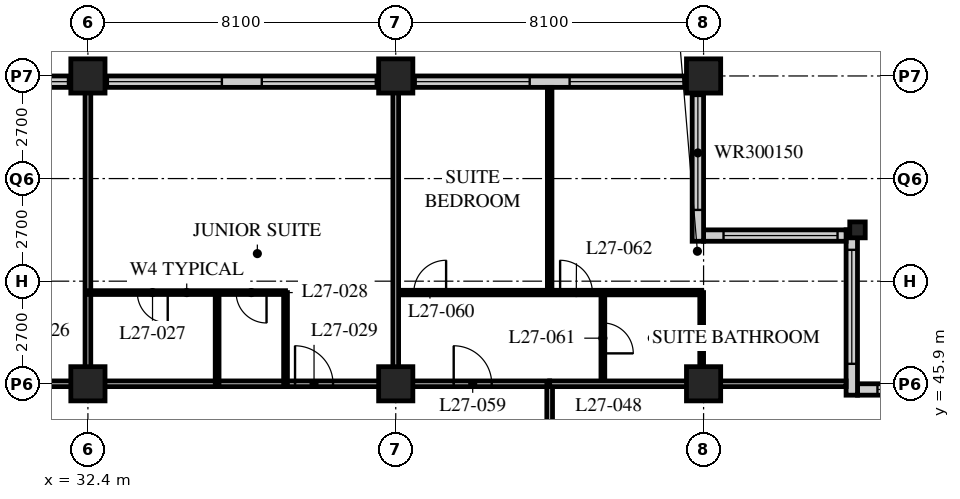
"""IFC4 building model, lengths in metres.
Left out: names, types, materials, properties, quantities, classifications, styles, units other than length and angle.
Written with IfcOpenShell. Run it as: python <this file> out.ifc"""

import sys

from ifc_helpers import new_model, si_unit, direction, frame, frame_2d, origin, origin_2d, place, context, subcontext, project, spatial, rectangle, hollow_rectangle, i_section, extrude, element, fill, save


model = new_model("IFC4")
c1 = context("Model", 3, precision=1e-05, world=origin(), true_north=direction((0.0, 1.0)))
c2 = subcontext(c1, "Body", "Model", "MODEL_VIEW")
j1 = project(units=[si_unit("LENGTHUNIT", "METRE"), si_unit("PLANEANGLEUNIT", "RADIAN")], contexts=[c1])
p1 = place(None, origin())
s1 = spatial("IfcSite", under=j1, at=p1, CompositionType="ELEMENT")
p2 = place(p1, origin())
s2 = spatial("IfcBuilding", under=s1, at=p2, CompositionType="ELEMENT")
p3 = place(p2, frame((0.0, 0.0, 110.2)))
s3 = spatial("IfcBuildingStorey", under=s2, at=p3, CompositionType="ELEMENT", Elevation=110.2)
for number, where, z_axis, x_axis in (
    (1, (32.4, 45.9, 0.0), (0.0, 0.0, 1.0), (1.0, 0.0, 0.0)),
    (2, (32.4, 54.0, 0.0), (0.0, 0.0, 1.0), (1.0, 0.0, 0.0)),
    (3, (40.5, 45.9, 0.0), (0.0, 0.0, 1.0), (1.0, 0.0, 0.0)),
    (4, (40.5, 54.0, 0.0), (0.0, 0.0, 1.0), (1.0, 0.0, 0.0)),
    (5, (48.6, 45.9, 0.0), (0.0, 0.0, 1.0), (1.0, 0.0, 0.0)),
    (6, (48.6, 54.0, 0.0), (0.0, 0.0, 1.0), (1.0, 0.0, 0.0)),
):
    element("IfcColumn", number, at=place(p3, frame(where, z_axis=z_axis, x_axis=x_axis)), inside=s3, PredefinedType="COLUMN", context=c2, shape_type="SweptSolid", body=[
        extrude(hollow_rectangle(XDim=0.9, YDim=0.9, WallThickness=0.09, at=origin_2d()), origin(), (0.0, 0.0, 1.0), 3.4),
    ])
p4 = place(p3, frame((52.65, 49.95, 0.0), z_axis=(0.0, 0.0, 1.0), x_axis=(1.0, 0.0, 0.0)))
e7 = element("IfcColumn", 7, at=p4, inside=s3, PredefinedType="COLUMN", context=c2, shape_type="SweptSolid", body=[
    extrude(i_section(OverallWidth=0.407, OverallDepth=0.419, WebThickness=0.031, FlangeThickness=0.049, FilletRadius=0.015, at=origin_2d()), origin(), (0.0, 0.0, 1.0), 3.4),
])
p5 = place(p3, frame((56.4, 45.75, 0.0), z_axis=(0.0, 0.0, 1.0), x_axis=(-1.0, 0.0, 0.0)))
e8 = element("IfcWall", 8, at=p5, inside=s3, PredefinedType="SOLIDWALL", context=c2, shape_type="SweptSolid", body=[
    extrude(rectangle(XDim=3.75, YDim=0.3, at=frame_2d((1.875, 0.0))), origin(), (0.0, 0.0, 1.0), 3.19),
])
p6 = place(p5, frame((0.225, 0.0, 0.9)))
e9 = element("IfcOpeningElement", 9, at=p6, cuts=e8, PredefinedType="OPENING", context=c2, shape_type="SweptSolid", body=[
    extrude(rectangle(XDim=3.0, YDim=1.5, at=frame_2d((1.5, 0.75))), frame((0.0, 0.16, 0.0), z_axis=(0.0, -1.0, 0.0), x_axis=(1.0, 0.0, 0.0)), (0.0, 0.0, 1.0), 0.32),
])
p7 = place(p3, frame((52.5, 45.6, 0.0), z_axis=(0.0, 0.0, 1.0), x_axis=(0.0, 1.0, 0.0)))
e10 = element("IfcWall", 10, at=p7, inside=s3, PredefinedType="SOLIDWALL", context=c2, shape_type="SweptSolid", body=[
    extrude(rectangle(XDim=4.35, YDim=0.3, at=frame_2d((2.175, 0.0))), origin(), (0.0, 0.0, 1.0), 3.19),
])
p8 = place(p7, frame((0.825, 0.0, 0.9)))
e11 = element("IfcOpeningElement", 11, at=p8, cuts=e10, PredefinedType="OPENING", context=c2, shape_type="SweptSolid", body=[
    extrude(rectangle(XDim=3.0, YDim=1.5, at=frame_2d((1.5, 0.75))), frame((0.0, 0.16, 0.0), z_axis=(0.0, -1.0, 0.0), x_axis=(1.0, 0.0, 0.0)), (0.0, 0.0, 1.0), 0.32),
])
p9 = place(p3, frame((52.35, 49.8, 0.0), z_axis=(0.0, 0.0, 1.0), x_axis=(-1.0, 0.0, 0.0)))
e12 = element("IfcWall", 12, at=p9, inside=s3, PredefinedType="SOLIDWALL", context=c2, shape_type="SweptSolid", body=[
    extrude(rectangle(XDim=3.75, YDim=0.3, at=frame_2d((1.875, 0.0))), origin(), (0.0, 0.0, 1.0), 3.19),
])
p10 = place(p9, frame((0.225, 0.0, 0.9)))
e13 = element("IfcOpeningElement", 13, at=p10, cuts=e12, PredefinedType="OPENING", context=c2, shape_type="SweptSolid", body=[
    extrude(rectangle(XDim=3.0, YDim=1.5, at=frame_2d((1.5, 0.75))), frame((0.0, 0.16, 0.0), z_axis=(0.0, -1.0, 0.0), x_axis=(1.0, 0.0, 0.0)), (0.0, 0.0, 1.0), 0.32),
])
p11 = place(p3, frame((48.45, 49.65, 0.0), z_axis=(0.0, 0.0, 1.0), x_axis=(0.0, 1.0, 0.0)))
e14 = element("IfcWall", 14, at=p11, inside=s3, PredefinedType="SOLIDWALL", context=c2, shape_type="SweptSolid", body=[
    extrude(rectangle(XDim=4.35, YDim=0.3, at=frame_2d((2.175, 0.0))), origin(), (0.0, 0.0, 1.0), 3.19),
])
p12 = place(p11, frame((0.825, 0.0, 0.9)))
e15 = element("IfcOpeningElement", 15, at=p12, cuts=e14, PredefinedType="OPENING", context=c2, shape_type="SweptSolid", body=[
    extrude(rectangle(XDim=3.0, YDim=1.5, at=frame_2d((1.5, 0.75))), frame((0.0, 0.16, 0.0), z_axis=(0.0, -1.0, 0.0), x_axis=(1.0, 0.0, 0.0)), (0.0, 0.0, 1.0), 0.32),
])
p13 = place(p3, frame((48.3, 53.85, 0.0), z_axis=(0.0, 0.0, 1.0), x_axis=(-1.0, 0.0, 0.0)))
e16 = element("IfcWall", 16, at=p13, inside=s3, PredefinedType="SOLIDWALL", context=c2, shape_type="SweptSolid", body=[
    extrude(rectangle(XDim=40.2, YDim=0.3, at=frame_2d((20.1, 0.0))), origin(), (0.0, 0.0, 1.0), 3.19),
])
p14 = place(p13, frame((0.225, 0.0, 0.9)))
e17 = element("IfcOpeningElement", 17, at=p14, cuts=e16, PredefinedType="OPENING", context=c2, shape_type="SweptSolid", body=[
    extrude(rectangle(XDim=3.0, YDim=2.0, at=frame_2d((1.5, 1.0))), frame((0.0, 0.16, 0.0), z_axis=(0.0, -1.0, 0.0), x_axis=(1.0, 0.0, 0.0)), (0.0, 0.0, 1.0), 0.32),
])
p15 = place(p13, frame((4.275, 0.0, 0.9)))
e18 = element("IfcOpeningElement", 18, at=p15, cuts=e16, PredefinedType="OPENING", context=c2, shape_type="SweptSolid", body=[
    extrude(rectangle(XDim=3.0, YDim=2.0, at=frame_2d((1.5, 1.0))), frame((0.0, 0.16, 0.0), z_axis=(0.0, -1.0, 0.0), x_axis=(1.0, 0.0, 0.0)), (0.0, 0.0, 1.0), 0.32),
])
p16 = place(p13, frame((8.325, 0.0, 0.9)))
e19 = element("IfcOpeningElement", 19, at=p16, cuts=e16, PredefinedType="OPENING", context=c2, shape_type="SweptSolid", body=[
    extrude(rectangle(XDim=3.0, YDim=2.0, at=frame_2d((1.5, 1.0))), frame((0.0, 0.16, 0.0), z_axis=(0.0, -1.0, 0.0), x_axis=(1.0, 0.0, 0.0)), (0.0, 0.0, 1.0), 0.32),
])
p17 = place(p13, frame((12.375, 0.0, 0.9)))
e20 = element("IfcOpeningElement", 20, at=p17, cuts=e16, PredefinedType="OPENING", context=c2, shape_type="SweptSolid", body=[
    extrude(rectangle(XDim=3.0, YDim=2.0, at=frame_2d((1.5, 1.0))), frame((0.0, 0.16, 0.0), z_axis=(0.0, -1.0, 0.0), x_axis=(1.0, 0.0, 0.0)), (0.0, 0.0, 1.0), 0.32),
])
p18 = place(p13, frame((16.425, 0.0, 0.9)))
e21 = element("IfcOpeningElement", 21, at=p18, cuts=e16, PredefinedType="OPENING", context=c2, shape_type="SweptSolid", body=[
    extrude(rectangle(XDim=3.0, YDim=2.0, at=frame_2d((1.5, 1.0))), frame((0.0, 0.16, 0.0), z_axis=(0.0, -1.0, 0.0), x_axis=(1.0, 0.0, 0.0)), (0.0, 0.0, 1.0), 0.32),
])
p19 = place(p13, frame((20.475, 0.0, 0.9)))
e22 = element("IfcOpeningElement", 22, at=p19, cuts=e16, PredefinedType="OPENING", context=c2, shape_type="SweptSolid", body=[
    extrude(rectangle(XDim=3.0, YDim=2.0, at=frame_2d((1.5, 1.0))), frame((0.0, 0.16, 0.0), z_axis=(0.0, -1.0, 0.0), x_axis=(1.0, 0.0, 0.0)), (0.0, 0.0, 1.0), 0.32),
])
p20 = place(p13, frame((24.525, 0.0, 0.9)))
e23 = element("IfcOpeningElement", 23, at=p20, cuts=e16, PredefinedType="OPENING", context=c2, shape_type="SweptSolid", body=[
    extrude(rectangle(XDim=3.0, YDim=2.0, at=frame_2d((1.5, 1.0))), frame((0.0, 0.16, 0.0), z_axis=(0.0, -1.0, 0.0), x_axis=(1.0, 0.0, 0.0)), (0.0, 0.0, 1.0), 0.32),
])
p21 = place(p13, frame((28.575, 0.0, 0.9)))
e24 = element("IfcOpeningElement", 24, at=p21, cuts=e16, PredefinedType="OPENING", context=c2, shape_type="SweptSolid", body=[
    extrude(rectangle(XDim=3.0, YDim=2.0, at=frame_2d((1.5, 1.0))), frame((0.0, 0.16, 0.0), z_axis=(0.0, -1.0, 0.0), x_axis=(1.0, 0.0, 0.0)), (0.0, 0.0, 1.0), 0.32),
])
p22 = place(p13, frame((32.625, 0.0, 0.9)))
e25 = element("IfcOpeningElement", 25, at=p22, cuts=e16, PredefinedType="OPENING", context=c2, shape_type="SweptSolid", body=[
    extrude(rectangle(XDim=3.0, YDim=2.0, at=frame_2d((1.5, 1.0))), frame((0.0, 0.16, 0.0), z_axis=(0.0, -1.0, 0.0), x_axis=(1.0, 0.0, 0.0)), (0.0, 0.0, 1.0), 0.32),
])
p23 = place(p13, frame((36.675, 0.0, 0.9)))
e26 = element("IfcOpeningElement", 26, at=p23, cuts=e16, PredefinedType="OPENING", context=c2, shape_type="SweptSolid", body=[
    extrude(rectangle(XDim=3.0, YDim=2.0, at=frame_2d((1.5, 1.0))), frame((0.0, 0.16, 0.0), z_axis=(0.0, -1.0, 0.0), x_axis=(1.0, 0.0, 0.0)), (0.0, 0.0, 1.0), 0.32),
])
p24 = place(p3, frame((12.15, 45.9, 0.0), z_axis=(0.0, 0.0, 1.0), x_axis=(1.0, 0.0, 0.0)))
e27 = element("IfcWall", 27, at=p24, inside=s3, PredefinedType="PARTITIONING", context=c2, shape_type="SweptSolid", body=[
    extrude(rectangle(XDim=32.4, YDim=0.15, at=frame_2d((16.2, 0.0))), origin(), (0.0, 0.0, 1.0), 2.578),
])
p25 = place(p24, frame((9.5, 0.0, 0.0)))
e28 = element("IfcOpeningElement", 28, at=p25, cuts=e27, PredefinedType="OPENING", context=c2, shape_type="SweptSolid", body=[
    extrude(rectangle(XDim=1.0, YDim=2.1, at=frame_2d((0.5, 1.05))), frame((0.0, 0.085, 0.0), z_axis=(0.0, -1.0, 0.0), x_axis=(1.0, 0.0, 0.0)), (0.0, 0.0, 1.0), 0.17),
])
p26 = place(p24, frame((17.6, 0.0, 0.0)))
e29 = element("IfcOpeningElement", 29, at=p26, cuts=e27, PredefinedType="OPENING", context=c2, shape_type="SweptSolid", body=[
    extrude(rectangle(XDim=1.0, YDim=2.1, at=frame_2d((0.5, 1.05))), frame((0.0, 0.085, 0.0), z_axis=(0.0, -1.0, 0.0), x_axis=(1.0, 0.0, 0.0)), (0.0, 0.0, 1.0), 0.17),
])
p27 = place(p24, frame((25.7, 0.0, 0.0)))
e30 = element("IfcOpeningElement", 30, at=p27, cuts=e27, PredefinedType="OPENING", context=c2, shape_type="SweptSolid", body=[
    extrude(rectangle(XDim=1.0, YDim=2.1, at=frame_2d((0.5, 1.05))), frame((0.0, 0.085, 0.0), z_axis=(0.0, -1.0, 0.0), x_axis=(1.0, 0.0, 0.0)), (0.0, 0.0, 1.0), 0.17),
])
p28 = place(p24, frame((29.875, 0.0, 0.0)))
e31 = element("IfcOpeningElement", 31, at=p28, cuts=e27, PredefinedType="OPENING", context=c2, shape_type="SweptSolid", body=[
    extrude(rectangle(XDim=1.0, YDim=2.1, at=frame_2d((0.5, 1.05))), frame((0.0, 0.085, 0.0), z_axis=(0.0, -1.0, 0.0), x_axis=(1.0, 0.0, 0.0)), (0.0, 0.0, 1.0), 0.17),
])
p29 = place(p24, frame((1.525, 0.0, 0.0)))
e32 = element("IfcOpeningElement", 32, at=p29, cuts=e27, PredefinedType="OPENING", context=c2, shape_type="SweptSolid", body=[
    extrude(rectangle(XDim=1.0, YDim=2.1, at=frame_2d((0.5, 1.05))), frame((0.0, 0.085, 0.0), z_axis=(0.0, -1.0, 0.0), x_axis=(1.0, 0.0, 0.0)), (0.0, 0.0, 1.0), 0.17),
])
p30 = place(p3, frame((44.55, 21.6, 0.0), z_axis=(0.0, 0.0, 1.0), x_axis=(0.0, 1.0, 0.0)))
e33 = element("IfcWall", 33, at=p30, inside=s3, PredefinedType="PARTITIONING", context=c2, shape_type="SweptSolid", body=[
    extrude(rectangle(XDim=24.3, YDim=0.15, at=frame_2d((12.15, 0.0))), origin(), (0.0, 0.0, 1.0), 3.19),
])
p31 = place(p30, frame((2.75, 0.0, 0.0)))
e34 = element("IfcOpeningElement", 34, at=p31, cuts=e33, PredefinedType="OPENING", context=c2, shape_type="SweptSolid", body=[
    extrude(rectangle(XDim=1.0, YDim=2.1, at=frame_2d((0.5, 1.05))), frame((0.0, 0.085, 0.0), z_axis=(0.0, -1.0, 0.0), x_axis=(1.0, 0.0, 0.0)), (0.0, 0.0, 1.0), 0.17),
])
p32 = place(p30, frame((6.5, 0.0, 0.0)))
e35 = element("IfcOpeningElement", 35, at=p32, cuts=e33, PredefinedType="OPENING", context=c2, shape_type="SweptSolid", body=[
    extrude(rectangle(XDim=1.0, YDim=2.1, at=frame_2d((0.5, 1.05))), frame((0.0, 0.085, 0.0), z_axis=(0.0, -1.0, 0.0), x_axis=(1.0, 0.0, 0.0)), (0.0, 0.0, 1.0), 0.17),
])
p33 = place(p30, frame((13.55, 0.0, 0.0)))
e36 = element("IfcOpeningElement", 36, at=p33, cuts=e33, PredefinedType="OPENING", context=c2, shape_type="SweptSolid", body=[
    extrude(rectangle(XDim=1.0, YDim=2.1, at=frame_2d((0.5, 1.05))), frame((0.0, 0.085, 0.0), z_axis=(0.0, -1.0, 0.0), x_axis=(1.0, 0.0, 0.0)), (0.0, 0.0, 1.0), 0.17),
])
p34 = place(p30, frame((21.65, 0.0, 0.0)))
e37 = element("IfcOpeningElement", 37, at=p34, cuts=e33, PredefinedType="OPENING", context=c2, shape_type="SweptSolid", body=[
    extrude(rectangle(XDim=1.0, YDim=2.1, at=frame_2d((0.5, 1.05))), frame((0.0, 0.085, 0.0), z_axis=(0.0, -1.0, 0.0), x_axis=(1.0, 0.0, 0.0)), (0.0, 0.0, 1.0), 0.17),
])
p35 = place(p3, frame((32.4, 45.9, 0.0), z_axis=(0.0, 0.0, 1.0), x_axis=(0.0, 1.0, 0.0)))
e38 = element("IfcWall", 38, at=p35, inside=s3, PredefinedType="PARTITIONING", context=c2, shape_type="SweptSolid", body=[
    extrude(rectangle(XDim=7.8, YDim=0.15, at=frame_2d((3.9, 0.0))), origin(), (0.0, 0.0, 1.0), 2.578),
])
p36 = place(p3, frame((32.4, 48.3, 0.0), z_axis=(0.0, 0.0, 1.0), x_axis=(1.0, 0.0, 0.0)))
e39 = element("IfcWall", 39, at=p36, inside=s3, PredefinedType="PARTITIONING", context=c2, shape_type="SweptSolid", body=[
    extrude(rectangle(XDim=5.2, YDim=0.1, at=frame_2d((2.6, 0.0))), origin(), (0.0, 0.0, 1.0), 3.19),
])
p37 = place(p36, frame((1.3, 0.0, 0.0)))
e40 = element("IfcOpeningElement", 40, at=p37, cuts=e39, PredefinedType="OPENING", context=c2, shape_type="SweptSolid", body=[
    extrude(rectangle(XDim=0.8, YDim=2.1, at=frame_2d((0.4, 1.05))), frame((0.0, 0.06, 0.0), z_axis=(0.0, -1.0, 0.0), x_axis=(1.0, 0.0, 0.0)), (0.0, 0.0, 1.0), 0.12),
])
p38 = place(p36, frame((3.9, 0.0, 0.0)))
e41 = element("IfcOpeningElement", 41, at=p38, cuts=e39, PredefinedType="OPENING", context=c2, shape_type="SweptSolid", body=[
    extrude(rectangle(XDim=0.8, YDim=2.1, at=frame_2d((0.4, 1.05))), frame((0.0, 0.06, 0.0), z_axis=(0.0, -1.0, 0.0), x_axis=(1.0, 0.0, 0.0)), (0.0, 0.0, 1.0), 0.12),
])
for number, where, z_axis, x_axis in (
    (42, (35.8, 45.9, 0.0), (0.0, 0.0, 1.0), (0.0, 1.0, 0.0)),
    (43, (37.6, 45.9, 0.0), (0.0, 0.0, 1.0), (0.0, 1.0, 0.0)),
):
    element("IfcWall", number, at=place(p3, frame(where, z_axis=z_axis, x_axis=x_axis)), inside=s3, PredefinedType="PARTITIONING", context=c2, shape_type="SweptSolid", body=[
        extrude(rectangle(XDim=2.4, YDim=0.1, at=frame_2d((1.2, 0.0))), origin(), (0.0, 0.0, 1.0), 3.19),
    ])
p39 = place(p3, frame((40.5, 48.3, 0.0), z_axis=(0.0, 0.0, 1.0), x_axis=(1.0, 0.0, 0.0)))
e44 = element("IfcWall", 44, at=p39, inside=s3, PredefinedType="PARTITIONING", context=c2, shape_type="SweptSolid", body=[
    extrude(rectangle(XDim=8.05, YDim=0.12, at=frame_2d((4.025, 0.0))), origin(), (0.0, 0.0, 1.0), 3.19),
])
p40 = place(p39, frame((0.475, 0.0, 0.0)))
e45 = element("IfcOpeningElement", 45, at=p40, cuts=e44, PredefinedType="OPENING", context=c2, shape_type="SweptSolid", body=[
    extrude(rectangle(XDim=0.85, YDim=2.1, at=frame_2d((0.425, 1.05))), frame((0.0, 0.07, 0.0), z_axis=(0.0, -1.0, 0.0), x_axis=(1.0, 0.0, 0.0)), (0.0, 0.0, 1.0), 0.14),
])
p41 = place(p39, frame((4.325, 0.0, 0.0)))
e46 = element("IfcOpeningElement", 46, at=p41, cuts=e44, PredefinedType="OPENING", context=c2, shape_type="SweptSolid", body=[
    extrude(rectangle(XDim=0.85, YDim=2.1, at=frame_2d((0.425, 1.05))), frame((0.0, 0.07, 0.0), z_axis=(0.0, -1.0, 0.0), x_axis=(1.0, 0.0, 0.0)), (0.0, 0.0, 1.0), 0.14),
])
p42 = place(p3, frame((45.95, 45.9, 0.0), z_axis=(0.0, 0.0, 1.0), x_axis=(0.0, 1.0, 0.0)))
e47 = element("IfcWall", 47, at=p42, inside=s3, PredefinedType="PARTITIONING", context=c2, shape_type="SweptSolid", body=[
    extrude(rectangle(XDim=2.4, YDim=0.1, at=frame_2d((1.2, 0.0))), origin(), (0.0, 0.0, 1.0), 3.19),
])
p43 = place(p42, frame((0.8, 0.0, 0.0)))
e48 = element("IfcOpeningElement", 48, at=p43, cuts=e47, PredefinedType="OPENING", context=c2, shape_type="SweptSolid", body=[
    extrude(rectangle(XDim=0.8, YDim=2.1, at=frame_2d((0.4, 1.05))), frame((0.0, 0.06, 0.0), z_axis=(0.0, -1.0, 0.0), x_axis=(1.0, 0.0, 0.0)), (0.0, 0.0, 1.0), 0.12),
])
p44 = place(p3, frame((48.55, 45.9, 0.0), z_axis=(0.0, 0.0, 1.0), x_axis=(0.0, 1.0, 0.0)))
e49 = element("IfcWall", 49, at=p44, inside=s3, PredefinedType="PARTITIONING", context=c2, shape_type="SweptSolid", body=[
    extrude(rectangle(XDim=2.4, YDim=0.1, at=frame_2d((1.2, 0.0))), origin(), (0.0, 0.0, 1.0), 2.578),
])
p45 = place(p3, frame((44.55, 48.3, 0.0), z_axis=(0.0, 0.0, 1.0), x_axis=(0.0, 1.0, 0.0)))
e50 = element("IfcWall", 50, at=p45, inside=s3, PredefinedType="PARTITIONING", context=c2, shape_type="SweptSolid", body=[
    extrude(rectangle(XDim=5.4, YDim=0.12, at=frame_2d((2.7, 0.0))), origin(), (0.0, 0.0, 1.0), 3.19),
])
for number, where, z_axis, x_axis in (
    (51, (44.55, 45.9, 0.0), (0.0, 0.0, 1.0), (1.0, 0.0, 0.0)),
    (52, (40.5, 45.9, 0.0), (0.0, 0.0, 1.0), (0.0, 1.0, 0.0)),
):
    element("IfcWall", number, at=place(p3, frame(where, z_axis=z_axis, x_axis=x_axis)), inside=s3, PredefinedType="PARTITIONING", context=c2, shape_type="SweptSolid", body=[
        extrude(rectangle(XDim=7.8, YDim=0.15, at=frame_2d((3.9, 0.0))), origin(), (0.0, 0.0, 1.0), 2.578),
    ])
p46 = place(p6, origin())
e53 = element("IfcWindow", 53, at=p46, inside=s3, PartitioningType="SINGLE_PANEL", PredefinedType="WINDOW", context=c2, shape_type="SweptSolid", body=[
    extrude(rectangle(XDim=3.0, YDim=1.5, at=frame_2d((1.5, 0.75))), frame((0.0, 0.03, 0.0), z_axis=(0.0, -1.0, 0.0), x_axis=(1.0, 0.0, 0.0)), (0.0, 0.0, 1.0), 0.06),
])
fill(e9, e53)
p47 = place(p8, origin())
e54 = element("IfcWindow", 54, at=p47, inside=s3, PartitioningType="SINGLE_PANEL", PredefinedType="WINDOW", context=c2, shape_type="SweptSolid", body=[
    extrude(rectangle(XDim=3.0, YDim=1.5, at=frame_2d((1.5, 0.75))), frame((0.0, 0.03, 0.0), z_axis=(0.0, -1.0, 0.0), x_axis=(1.0, 0.0, 0.0)), (0.0, 0.0, 1.0), 0.06),
])
fill(e11, e54)
p48 = place(p10, origin())
e55 = element("IfcWindow", 55, at=p48, inside=s3, PartitioningType="SINGLE_PANEL", PredefinedType="WINDOW", context=c2, shape_type="SweptSolid", body=[
    extrude(rectangle(XDim=3.0, YDim=1.5, at=frame_2d((1.5, 0.75))), frame((0.0, 0.03, 0.0), z_axis=(0.0, -1.0, 0.0), x_axis=(1.0, 0.0, 0.0)), (0.0, 0.0, 1.0), 0.06),
])
fill(e13, e55)
p49 = place(p12, origin())
e56 = element("IfcWindow", 56, at=p49, inside=s3, PartitioningType="SINGLE_PANEL", PredefinedType="WINDOW", context=c2, shape_type="SweptSolid", body=[
    extrude(rectangle(XDim=3.0, YDim=1.5, at=frame_2d((1.5, 0.75))), frame((0.0, 0.03, 0.0), z_axis=(0.0, -1.0, 0.0), x_axis=(1.0, 0.0, 0.0)), (0.0, 0.0, 1.0), 0.06),
])
fill(e15, e56)
p50 = place(p14, origin())
e57 = element("IfcWindow", 57, at=p50, inside=s3, PartitioningType="SINGLE_PANEL", PredefinedType="WINDOW", context=c2, shape_type="SweptSolid", body=[
    extrude(rectangle(XDim=3.0, YDim=2.0, at=frame_2d((1.5, 1.0))), frame((0.0, 0.03, 0.0), z_axis=(0.0, -1.0, 0.0), x_axis=(1.0, 0.0, 0.0)), (0.0, 0.0, 1.0), 0.06),
])
fill(e17, e57)
p51 = place(p15, origin())
e58 = element("IfcWindow", 58, at=p51, inside=s3, PartitioningType="SINGLE_PANEL", PredefinedType="WINDOW", context=c2, shape_type="SweptSolid", body=[
    extrude(rectangle(XDim=3.0, YDim=2.0, at=frame_2d((1.5, 1.0))), frame((0.0, 0.03, 0.0), z_axis=(0.0, -1.0, 0.0), x_axis=(1.0, 0.0, 0.0)), (0.0, 0.0, 1.0), 0.06),
])
fill(e18, e58)
p52 = place(p16, origin())
e59 = element("IfcWindow", 59, at=p52, inside=s3, PartitioningType="SINGLE_PANEL", PredefinedType="WINDOW", context=c2, shape_type="SweptSolid", body=[
    extrude(rectangle(XDim=3.0, YDim=2.0, at=frame_2d((1.5, 1.0))), frame((0.0, 0.03, 0.0), z_axis=(0.0, -1.0, 0.0), x_axis=(1.0, 0.0, 0.0)), (0.0, 0.0, 1.0), 0.06),
])
fill(e19, e59)
p53 = place(p17, origin())
e60 = element("IfcWindow", 60, at=p53, inside=s3, PartitioningType="SINGLE_PANEL", PredefinedType="WINDOW", context=c2, shape_type="SweptSolid", body=[
    extrude(rectangle(XDim=3.0, YDim=2.0, at=frame_2d((1.5, 1.0))), frame((0.0, 0.03, 0.0), z_axis=(0.0, -1.0, 0.0), x_axis=(1.0, 0.0, 0.0)), (0.0, 0.0, 1.0), 0.06),
])
fill(e20, e60)
p54 = place(p18, origin())
e61 = element("IfcWindow", 61, at=p54, inside=s3, PartitioningType="SINGLE_PANEL", PredefinedType="WINDOW", context=c2, shape_type="SweptSolid", body=[
    extrude(rectangle(XDim=3.0, YDim=2.0, at=frame_2d((1.5, 1.0))), frame((0.0, 0.03, 0.0), z_axis=(0.0, -1.0, 0.0), x_axis=(1.0, 0.0, 0.0)), (0.0, 0.0, 1.0), 0.06),
])
fill(e21, e61)
p55 = place(p37, origin())
e62 = element("IfcDoor", 62, at=p55, inside=s3, OperationType="SINGLE_SWING_LEFT", PredefinedType="DOOR", context=c2, shape_type="SweptSolid", body=[
    extrude(rectangle(XDim=0.8, YDim=2.1, at=frame_2d((0.4, 1.05))), frame((0.0, 0.025, 0.0), z_axis=(0.0, -1.0, 0.0), x_axis=(1.0, 0.0, 0.0)), (0.0, 0.0, 1.0), 0.05),
])
fill(e40, e62)
p56 = place(p38, origin())
e63 = element("IfcDoor", 63, at=p56, inside=s3, OperationType="SINGLE_SWING_LEFT", PredefinedType="DOOR", context=c2, shape_type="SweptSolid", body=[
    extrude(rectangle(XDim=0.8, YDim=2.1, at=frame_2d((0.4, 1.05))), frame((0.0, 0.025, 0.0), z_axis=(0.0, -1.0, 0.0), x_axis=(1.0, 0.0, 0.0)), (0.0, 0.0, 1.0), 0.05),
])
fill(e41, e63)
p57 = place(p27, origin())
e64 = element("IfcDoor", 64, at=p57, inside=s3, OperationType="SINGLE_SWING_LEFT", PredefinedType="DOOR", context=c2, shape_type="SweptSolid", body=[
    extrude(rectangle(XDim=1.0, YDim=2.1, at=frame_2d((0.5, 1.05))), frame((0.0, 0.025, 0.0), z_axis=(0.0, -1.0, 0.0), x_axis=(1.0, 0.0, 0.0)), (0.0, 0.0, 1.0), 0.05),
])
fill(e30, e64)
p58 = place(p28, origin())
e65 = element("IfcDoor", 65, at=p58, inside=s3, OperationType="SINGLE_SWING_LEFT", PredefinedType="DOOR", context=c2, shape_type="SweptSolid", body=[
    extrude(rectangle(XDim=1.0, YDim=2.1, at=frame_2d((0.5, 1.05))), frame((0.0, 0.025, 0.0), z_axis=(0.0, -1.0, 0.0), x_axis=(1.0, 0.0, 0.0)), (0.0, 0.0, 1.0), 0.05),
])
fill(e31, e65)
p59 = place(p40, origin())
e66 = element("IfcDoor", 66, at=p59, inside=s3, OperationType="SINGLE_SWING_RIGHT", PredefinedType="DOOR", context=c2, shape_type="SweptSolid", body=[
    extrude(rectangle(XDim=0.85, YDim=2.1, at=frame_2d((0.425, 1.05))), frame((0.0, 0.025, 0.0), z_axis=(0.0, -1.0, 0.0), x_axis=(1.0, 0.0, 0.0)), (0.0, 0.0, 1.0), 0.05),
])
fill(e45, e66)
p60 = place(p43, origin())
e67 = element("IfcDoor", 67, at=p60, inside=s3, OperationType="SINGLE_SWING_RIGHT", PredefinedType="DOOR", context=c2, shape_type="SweptSolid", body=[
    extrude(rectangle(XDim=0.8, YDim=2.1, at=frame_2d((0.4, 1.05))), frame((0.0, 0.025, 0.0), z_axis=(0.0, -1.0, 0.0), x_axis=(1.0, 0.0, 0.0)), (0.0, 0.0, 1.0), 0.05),
])
fill(e48, e67)
p61 = place(p41, origin())
e68 = element("IfcDoor", 68, at=p61, inside=s3, OperationType="SINGLE_SWING_LEFT", PredefinedType="DOOR", context=c2, shape_type="SweptSolid", body=[
    extrude(rectangle(XDim=0.85, YDim=2.1, at=frame_2d((0.425, 1.05))), frame((0.0, 0.025, 0.0), z_axis=(0.0, -1.0, 0.0), x_axis=(1.0, 0.0, 0.0)), (0.0, 0.0, 1.0), 0.05),
])
fill(e46, e68)
save(model, sys.argv[1])
